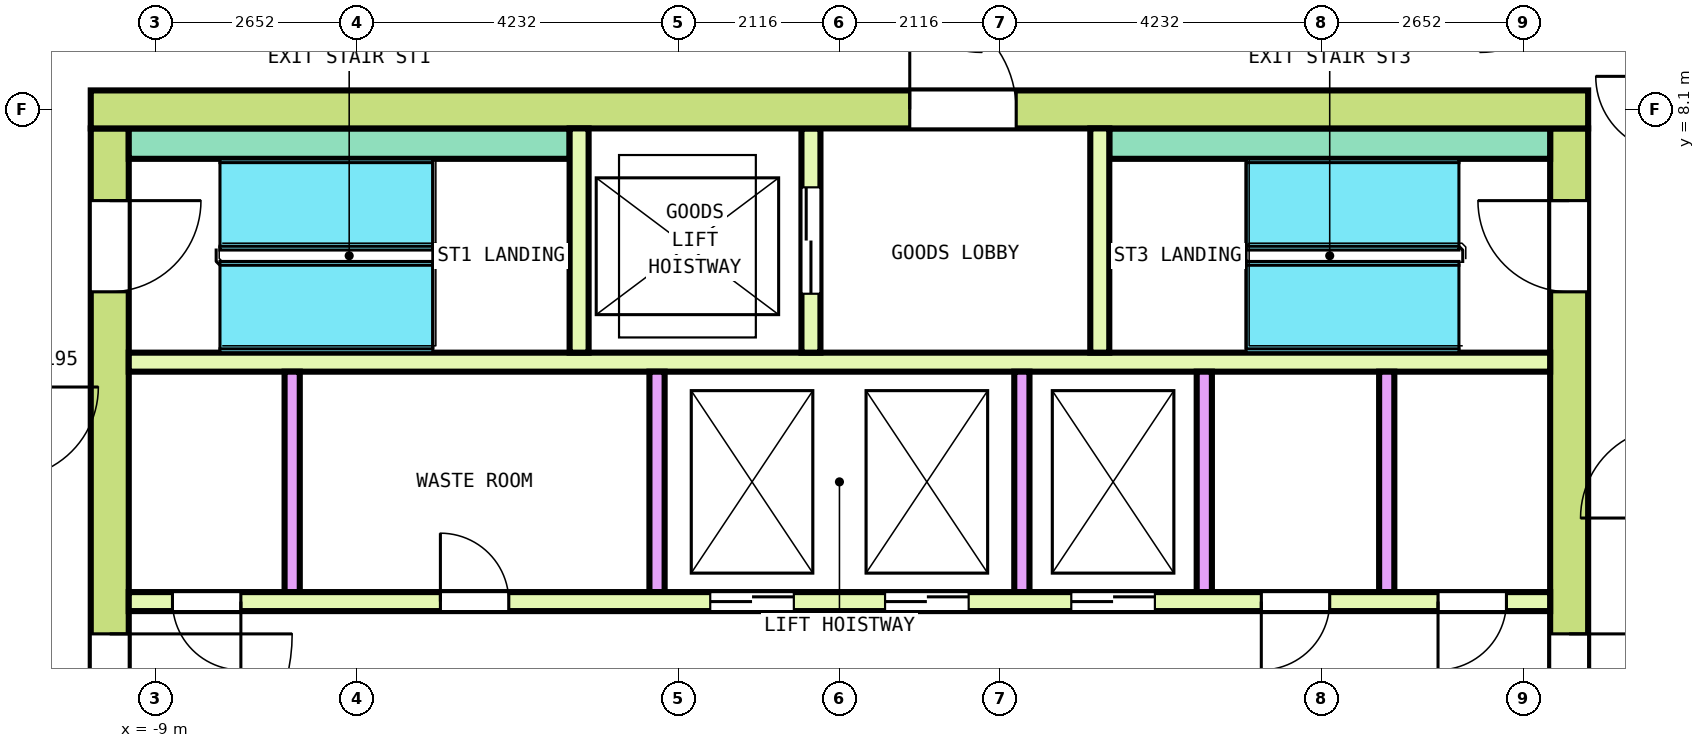
"""IFC4 building model, lengths in metres.
Left out: names, types, materials, properties, quantities, classifications, styles, units other than length and angle.
Written with IfcOpenShell. Run it as: python <this file> out.ifc"""

import sys

from ifc_helpers import new_model, si_unit, direction, frame, frame_2d, origin, place, context, subcontext, project, spatial, rectangle, extrude, element, fill, save


model = new_model("IFC4")
c1 = context("Model", 3, precision=1e-05, world=origin(), true_north=direction((0.0, 1.0)))
c2 = subcontext(c1, "Body", "Model", "MODEL_VIEW")
j1 = project(units=[si_unit("LENGTHUNIT", "METRE"), si_unit("PLANEANGLEUNIT", "RADIAN")], contexts=[c1])
p1 = place(None, origin())
s1 = spatial("IfcSite", under=j1, at=p1, CompositionType="ELEMENT")
p2 = place(p1, origin())
s2 = spatial("IfcBuilding", under=s1, at=p2, CompositionType="ELEMENT")
p3 = place(p2, frame((0.0, 0.0, 283.0)))
s3 = spatial("IfcBuildingStorey", under=s2, at=p3, CompositionType="ELEMENT", Elevation=283.0)
p4 = place(p3, frame((-9.85, 8.1, 0.0), z_axis=(0.0, 0.0, 1.0), x_axis=(1.0, 0.0, 0.0)))
e1 = element("IfcWall", 1, at=p4, inside=s3, PredefinedType="SHEAR", context=c2, shape_type="SweptSolid", body=[
    extrude(rectangle(XDim=19.7, YDim=0.5, at=frame_2d((9.85, 0.0))), origin(), (0.0, 0.0, 1.0), 3.7),
])
p5 = place(p4, frame((10.775, 0.0, 0.0)))
e2 = element("IfcOpeningElement", 2, at=p5, cuts=e1, PredefinedType="OPENING", context=c2, shape_type="SweptSolid", body=[
    extrude(rectangle(XDim=1.4, YDim=2.1, at=frame_2d((0.7, 1.05))), frame((0.0, 0.26, 0.0), z_axis=(0.0, -1.0, 0.0), x_axis=(1.0, 0.0, 0.0)), (0.0, 0.0, 1.0), 0.52),
])
p6 = place(p3, frame((-9.6, -7.85, 0.0), z_axis=(0.0, 0.0, 1.0), x_axis=(0.0, 1.0, 0.0)))
e3 = element("IfcWall", 3, at=p6, inside=s3, PredefinedType="SHEAR", context=c2, shape_type="SweptSolid", body=[
    extrude(rectangle(XDim=15.7, YDim=0.5, at=frame_2d((7.85, 0.0))), origin(), (0.0, 0.0, 1.0), 3.7),
])
p7 = place(p6, frame((6.65, 0.0, 0.0)))
e4 = element("IfcOpeningElement", 4, at=p7, cuts=e3, PredefinedType="OPENING", context=c2, shape_type="SweptSolid", body=[
    extrude(rectangle(XDim=2.4, YDim=2.1, at=frame_2d((1.2, 1.05))), frame((0.0, 0.26, 0.0), z_axis=(0.0, -1.0, 0.0), x_axis=(1.0, 0.0, 0.0)), (0.0, 0.0, 1.0), 0.52),
])
p8 = place(p6, frame((13.55, 0.0, 0.0)))
e5 = element("IfcOpeningElement", 5, at=p8, cuts=e3, PredefinedType="OPENING", context=c2, shape_type="SweptSolid", body=[
    extrude(rectangle(XDim=1.2, YDim=2.1, at=frame_2d((0.6, 1.05))), frame((0.0, 0.26, 0.0), z_axis=(0.0, -1.0, 0.0), x_axis=(1.0, 0.0, 0.0)), (0.0, 0.0, 1.0), 0.52),
])
p9 = place(p6, frame((0.95, 0.0, 0.0)))
e6 = element("IfcOpeningElement", 6, at=p9, cuts=e3, PredefinedType="OPENING", context=c2, shape_type="SweptSolid", body=[
    extrude(rectangle(XDim=1.2, YDim=2.1, at=frame_2d((0.6, 1.05))), frame((0.0, 0.26, 0.0), z_axis=(0.0, -1.0, 0.0), x_axis=(1.0, 0.0, 0.0)), (0.0, 0.0, 1.0), 0.52),
])
p10 = place(p3, frame((9.6, -7.85, 0.0), z_axis=(0.0, 0.0, 1.0), x_axis=(0.0, 1.0, 0.0)))
e7 = element("IfcWall", 7, at=p10, inside=s3, PredefinedType="SHEAR", context=c2, shape_type="SweptSolid", body=[
    extrude(rectangle(XDim=15.7, YDim=0.5, at=frame_2d((7.85, 0.0))), origin(), (0.0, 0.0, 1.0), 3.7),
])
p11 = place(p10, frame((6.65, 0.0, 0.0)))
e8 = element("IfcOpeningElement", 8, at=p11, cuts=e7, PredefinedType="OPENING", context=c2, shape_type="SweptSolid", body=[
    extrude(rectangle(XDim=2.4, YDim=2.1, at=frame_2d((1.2, 1.05))), frame((0.0, 0.26, 0.0), z_axis=(0.0, -1.0, 0.0), x_axis=(1.0, 0.0, 0.0)), (0.0, 0.0, 1.0), 0.52),
])
p12 = place(p10, frame((13.55, 0.0, 0.0)))
e9 = element("IfcOpeningElement", 9, at=p12, cuts=e7, PredefinedType="OPENING", context=c2, shape_type="SweptSolid", body=[
    extrude(rectangle(XDim=1.2, YDim=2.1, at=frame_2d((0.6, 1.05))), frame((0.0, 0.26, 0.0), z_axis=(0.0, -1.0, 0.0), x_axis=(1.0, 0.0, 0.0)), (0.0, 0.0, 1.0), 0.52),
])
p13 = place(p10, frame((1.05, 0.0, 0.0)))
e10 = element("IfcOpeningElement", 10, at=p13, cuts=e7, PredefinedType="OPENING", context=c2, shape_type="SweptSolid", body=[
    extrude(rectangle(XDim=1.0, YDim=2.1, at=frame_2d((0.5, 1.05))), frame((0.0, 0.26, 0.0), z_axis=(0.0, -1.0, 0.0), x_axis=(1.0, 0.0, 0.0)), (0.0, 0.0, 1.0), 0.52),
])
p14 = place(p3, frame((-9.35, 1.625, 0.0), z_axis=(0.0, 0.0, 1.0), x_axis=(1.0, 0.0, 0.0)))
e11 = element("IfcWall", 11, at=p14, inside=s3, PredefinedType="SOLIDWALL", context=c2, shape_type="SweptSolid", body=[
    extrude(rectangle(XDim=18.7, YDim=0.25, at=frame_2d((9.35, 0.0))), origin(), (0.0, 0.0, 1.0), 3.7),
])
p15 = place(p14, frame((7.65, 0.0, 0.0)))
e12 = element("IfcOpeningElement", 12, at=p15, cuts=e11, PredefinedType="OPENING", context=c2, shape_type="SweptSolid", body=[
    extrude(rectangle(XDim=1.1, YDim=2.1, at=frame_2d((0.55, 1.05))), frame((0.0, 0.135, 0.0), z_axis=(0.0, -1.0, 0.0), x_axis=(1.0, 0.0, 0.0)), (0.0, 0.0, 1.0), 0.27),
])
p16 = place(p14, frame((9.95, 0.0, 0.0)))
e13 = element("IfcOpeningElement", 13, at=p16, cuts=e11, PredefinedType="OPENING", context=c2, shape_type="SweptSolid", body=[
    extrude(rectangle(XDim=1.1, YDim=2.1, at=frame_2d((0.55, 1.05))), frame((0.0, 0.135, 0.0), z_axis=(0.0, -1.0, 0.0), x_axis=(1.0, 0.0, 0.0)), (0.0, 0.0, 1.0), 0.27),
])
p17 = place(p14, frame((12.4, 0.0, 0.0)))
e14 = element("IfcOpeningElement", 14, at=p17, cuts=e11, PredefinedType="OPENING", context=c2, shape_type="SweptSolid", body=[
    extrude(rectangle(XDim=1.1, YDim=2.1, at=frame_2d((0.55, 1.05))), frame((0.0, 0.135, 0.0), z_axis=(0.0, -1.0, 0.0), x_axis=(1.0, 0.0, 0.0)), (0.0, 0.0, 1.0), 0.27),
])
p18 = place(p14, frame((0.575, 0.0, 0.0)))
e15 = element("IfcOpeningElement", 15, at=p18, cuts=e11, PredefinedType="OPENING", context=c2, shape_type="SweptSolid", body=[
    extrude(rectangle(XDim=0.9, YDim=2.1, at=frame_2d((0.45, 1.05))), frame((0.0, 0.135, 0.0), z_axis=(0.0, -1.0, 0.0), x_axis=(1.0, 0.0, 0.0)), (0.0, 0.0, 1.0), 0.27),
])
p19 = place(p14, frame((4.1, 0.0, 0.0)))
e16 = element("IfcOpeningElement", 16, at=p19, cuts=e11, PredefinedType="OPENING", context=c2, shape_type="SweptSolid", body=[
    extrude(rectangle(XDim=0.9, YDim=2.1, at=frame_2d((0.45, 1.05))), frame((0.0, 0.135, 0.0), z_axis=(0.0, -1.0, 0.0), x_axis=(1.0, 0.0, 0.0)), (0.0, 0.0, 1.0), 0.27),
])
p20 = place(p14, frame((14.9, 0.0, 0.0)))
e17 = element("IfcOpeningElement", 17, at=p20, cuts=e11, PredefinedType="OPENING", context=c2, shape_type="SweptSolid", body=[
    extrude(rectangle(XDim=0.9, YDim=2.1, at=frame_2d((0.45, 1.05))), frame((0.0, 0.135, 0.0), z_axis=(0.0, -1.0, 0.0), x_axis=(1.0, 0.0, 0.0)), (0.0, 0.0, 1.0), 0.27),
])
p21 = place(p14, frame((17.225, 0.0, 0.0)))
e18 = element("IfcOpeningElement", 18, at=p21, cuts=e11, PredefinedType="OPENING", context=c2, shape_type="SweptSolid", body=[
    extrude(rectangle(XDim=0.9, YDim=2.1, at=frame_2d((0.45, 1.05))), frame((0.0, 0.135, 0.0), z_axis=(0.0, -1.0, 0.0), x_axis=(1.0, 0.0, 0.0)), (0.0, 0.0, 1.0), 0.27),
])
p22 = place(p3, frame((-9.35, 4.775, 0.0), z_axis=(0.0, 0.0, 1.0), x_axis=(1.0, 0.0, 0.0)))
e19 = element("IfcWall", 19, at=p22, inside=s3, PredefinedType="SOLIDWALL", context=c2, shape_type="SweptSolid", body=[
    extrude(rectangle(XDim=18.7, YDim=0.25, at=frame_2d((9.35, 0.0))), origin(), (0.0, 0.0, 1.0), 3.7),
])
for number, where, z_axis, x_axis in (
    (20, (-7.2, 1.75, 0.0), (0.0, 0.0, 1.0), (0.0, 1.0, 0.0)),
    (21, (-2.4, 1.75, 0.0), (0.0, 0.0, 1.0), (0.0, 1.0, 0.0)),
    (22, (2.4, 1.75, 0.0), (0.0, 0.0, 1.0), (0.0, 1.0, 0.0)),
    (23, (4.8, 1.75, 0.0), (0.0, 0.0, 1.0), (0.0, 1.0, 0.0)),
    (24, (7.2, 1.75, 0.0), (0.0, 0.0, 1.0), (0.0, 1.0, 0.0)),
):
    element("IfcWall", number, at=place(p3, frame(where, z_axis=z_axis, x_axis=x_axis)), inside=s3, PredefinedType="SOLIDWALL", context=c2, shape_type="SweptSolid", body=[
        extrude(rectangle(XDim=2.9, YDim=0.2, at=frame_2d((1.45, 0.0))), origin(), (0.0, 0.0, 1.0), 3.7),
    ])
for number, where, z_axis, x_axis in (
    (25, (-9.35, 7.65, 0.0), (0.0, 0.0, 1.0), (1.0, 0.0, 0.0)),
    (26, (3.55, 7.65, 0.0), (0.0, 0.0, 1.0), (1.0, 0.0, 0.0)),
):
    element("IfcWall", number, at=place(p3, frame(where, z_axis=z_axis, x_axis=x_axis)), inside=s3, PredefinedType="SOLIDWALL", context=c2, shape_type="SweptSolid", body=[
        extrude(rectangle(XDim=5.8, YDim=0.4, at=frame_2d((2.9, 0.0))), origin(), (0.0, 0.0, 1.0), 3.7),
    ])
p23 = place(p3, frame((-3.425, 4.9, 0.0), z_axis=(0.0, 0.0, 1.0), x_axis=(0.0, 1.0, 0.0)))
e27 = element("IfcWall", 27, at=p23, inside=s3, PredefinedType="SOLIDWALL", context=c2, shape_type="SweptSolid", body=[
    extrude(rectangle(XDim=2.95, YDim=0.25, at=frame_2d((1.475, 0.0))), origin(), (0.0, 0.0, 1.0), 3.7),
])
p24 = place(p3, frame((-0.375, 4.9, 0.0), z_axis=(0.0, 0.0, 1.0), x_axis=(0.0, 1.0, 0.0)))
e28 = element("IfcWall", 28, at=p24, inside=s3, PredefinedType="SOLIDWALL", context=c2, shape_type="SweptSolid", body=[
    extrude(rectangle(XDim=2.95, YDim=0.25, at=frame_2d((1.475, 0.0))), origin(), (0.0, 0.0, 1.0), 3.7),
])
p25 = place(p24, frame((0.775, 0.0, 0.0)))
e29 = element("IfcOpeningElement", 29, at=p25, cuts=e28, PredefinedType="OPENING", context=c2, shape_type="SweptSolid", body=[
    extrude(rectangle(XDim=1.4, YDim=2.1, at=frame_2d((0.7, 1.05))), frame((0.0, 0.135, 0.0), z_axis=(0.0, -1.0, 0.0), x_axis=(1.0, 0.0, 0.0)), (0.0, 0.0, 1.0), 0.27),
])
p26 = place(p3, frame((3.425, 4.9, 0.0), z_axis=(0.0, 0.0, 1.0), x_axis=(0.0, 1.0, 0.0)))
e30 = element("IfcWall", 30, at=p26, inside=s3, PredefinedType="SOLIDWALL", context=c2, shape_type="SweptSolid", body=[
    extrude(rectangle(XDim=2.95, YDim=0.25, at=frame_2d((1.475, 0.0))), origin(), (0.0, 0.0, 1.0), 3.7),
])
p27 = place(p15, origin())
e31 = element("IfcDoor", 31, at=p27, inside=s3, OperationType="DOUBLE_DOOR_SLIDING", PredefinedType="DOOR", context=c2, shape_type="SweptSolid", body=[
    extrude(rectangle(XDim=1.1, YDim=2.1, at=frame_2d((0.55, 1.05))), frame((0.0, 0.075, 0.0), z_axis=(0.0, -1.0, 0.0), x_axis=(1.0, 0.0, 0.0)), (0.0, 0.0, 1.0), 0.15),
])
fill(e12, e31)
p28 = place(p16, origin())
e32 = element("IfcDoor", 32, at=p28, inside=s3, OperationType="DOUBLE_DOOR_SLIDING", PredefinedType="DOOR", context=c2, shape_type="SweptSolid", body=[
    extrude(rectangle(XDim=1.1, YDim=2.1, at=frame_2d((0.55, 1.05))), frame((0.0, 0.075, 0.0), z_axis=(0.0, -1.0, 0.0), x_axis=(1.0, 0.0, 0.0)), (0.0, 0.0, 1.0), 0.15),
])
fill(e13, e32)
p29 = place(p17, origin())
e33 = element("IfcDoor", 33, at=p29, inside=s3, OperationType="DOUBLE_DOOR_SLIDING", PredefinedType="DOOR", context=c2, shape_type="SweptSolid", body=[
    extrude(rectangle(XDim=1.1, YDim=2.1, at=frame_2d((0.55, 1.05))), frame((0.0, 0.075, 0.0), z_axis=(0.0, -1.0, 0.0), x_axis=(1.0, 0.0, 0.0)), (0.0, 0.0, 1.0), 0.15),
])
fill(e14, e33)
p30 = place(p25, origin())
e34 = element("IfcDoor", 34, at=p30, inside=s3, OperationType="DOUBLE_DOOR_SLIDING", PredefinedType="DOOR", context=c2, shape_type="SweptSolid", body=[
    extrude(rectangle(XDim=1.4, YDim=2.1, at=frame_2d((0.7, 1.05))), frame((0.0, 0.075, 0.0), z_axis=(0.0, -1.0, 0.0), x_axis=(1.0, 0.0, 0.0)), (0.0, 0.0, 1.0), 0.15),
])
fill(e29, e34)
p31 = place(p7, origin())
e35 = element("IfcDoor", 35, at=p31, inside=s3, OperationType="DOUBLE_DOOR_SINGLE_SWING", PredefinedType="DOOR", context=c2, shape_type="SweptSolid", body=[
    extrude(rectangle(XDim=2.4, YDim=2.1, at=frame_2d((1.2, 1.05))), frame((0.0, 0.2, 0.0), z_axis=(0.0, -1.0, 0.0), x_axis=(1.0, 0.0, 0.0)), (0.0, 0.0, 1.0), 0.4),
])
fill(e4, e35)
p32 = place(p11, origin())
e36 = element("IfcDoor", 36, at=p32, inside=s3, OperationType="DOUBLE_DOOR_SINGLE_SWING", PredefinedType="DOOR", context=c2, shape_type="SweptSolid", body=[
    extrude(rectangle(XDim=2.4, YDim=2.1, at=frame_2d((1.2, 1.05))), frame((0.0, 0.2, 0.0), z_axis=(0.0, -1.0, 0.0), x_axis=(1.0, 0.0, 0.0)), (0.0, 0.0, 1.0), 0.4),
])
fill(e8, e36)
p33 = place(p8, origin())
e37 = element("IfcDoor", 37, at=p33, inside=s3, OperationType="SINGLE_SWING_RIGHT", PredefinedType="DOOR", context=c2, shape_type="SweptSolid", body=[
    extrude(rectangle(XDim=1.2, YDim=2.1, at=frame_2d((0.6, 1.05))), frame((0.0, 0.2, 0.0), z_axis=(0.0, -1.0, 0.0), x_axis=(1.0, 0.0, 0.0)), (0.0, 0.0, 1.0), 0.4),
])
fill(e5, e37)
p34 = place(p12, origin())
e38 = element("IfcDoor", 38, at=p34, inside=s3, OperationType="SINGLE_SWING_RIGHT", PredefinedType="DOOR", context=c2, shape_type="SweptSolid", body=[
    extrude(rectangle(XDim=1.2, YDim=2.1, at=frame_2d((0.6, 1.05))), frame((0.0, 0.2, 0.0), z_axis=(0.0, -1.0, 0.0), x_axis=(1.0, 0.0, 0.0)), (0.0, 0.0, 1.0), 0.4),
])
fill(e9, e38)
p35 = place(p5, origin())
e39 = element("IfcDoor", 39, at=p35, inside=s3, OperationType="DOUBLE_DOOR_SINGLE_SWING", PredefinedType="DOOR", context=c2, shape_type="SweptSolid", body=[
    extrude(rectangle(XDim=1.4, YDim=2.1, at=frame_2d((0.7, 1.05))), frame((0.0, 0.2, 0.0), z_axis=(0.0, -1.0, 0.0), x_axis=(1.0, 0.0, 0.0)), (0.0, 0.0, 1.0), 0.4),
])
fill(e2, e39)
p36 = place(p18, origin())
e40 = element("IfcDoor", 40, at=p36, inside=s3, OperationType="SINGLE_SWING_RIGHT", PredefinedType="DOOR", context=c2, shape_type="SweptSolid", body=[
    extrude(rectangle(XDim=0.9, YDim=2.1, at=frame_2d((0.45, 1.05))), frame((0.0, 0.075, 0.0), z_axis=(0.0, -1.0, 0.0), x_axis=(1.0, 0.0, 0.0)), (0.0, 0.0, 1.0), 0.15),
])
fill(e15, e40)
p37 = place(p19, origin())
e41 = element("IfcDoor", 41, at=p37, inside=s3, OperationType="SINGLE_SWING_LEFT", PredefinedType="DOOR", context=c2, shape_type="SweptSolid", body=[
    extrude(rectangle(XDim=0.9, YDim=2.1, at=frame_2d((0.45, 1.05))), frame((0.0, 0.075, 0.0), z_axis=(0.0, -1.0, 0.0), x_axis=(1.0, 0.0, 0.0)), (0.0, 0.0, 1.0), 0.15),
])
fill(e16, e41)
p38 = place(p20, origin())
e42 = element("IfcDoor", 42, at=p38, inside=s3, OperationType="SINGLE_SWING_RIGHT", PredefinedType="DOOR", context=c2, shape_type="SweptSolid", body=[
    extrude(rectangle(XDim=0.9, YDim=2.1, at=frame_2d((0.45, 1.05))), frame((0.0, 0.075, 0.0), z_axis=(0.0, -1.0, 0.0), x_axis=(1.0, 0.0, 0.0)), (0.0, 0.0, 1.0), 0.15),
])
fill(e17, e42)
p39 = place(p21, origin())
e43 = element("IfcDoor", 43, at=p39, inside=s3, OperationType="SINGLE_SWING_LEFT", PredefinedType="DOOR", context=c2, shape_type="SweptSolid", body=[
    extrude(rectangle(XDim=0.9, YDim=2.1, at=frame_2d((0.45, 1.05))), frame((0.0, 0.075, 0.0), z_axis=(0.0, -1.0, 0.0), x_axis=(1.0, 0.0, 0.0)), (0.0, 0.0, 1.0), 0.15),
])
fill(e18, e43)
save(model, sys.argv[1])
